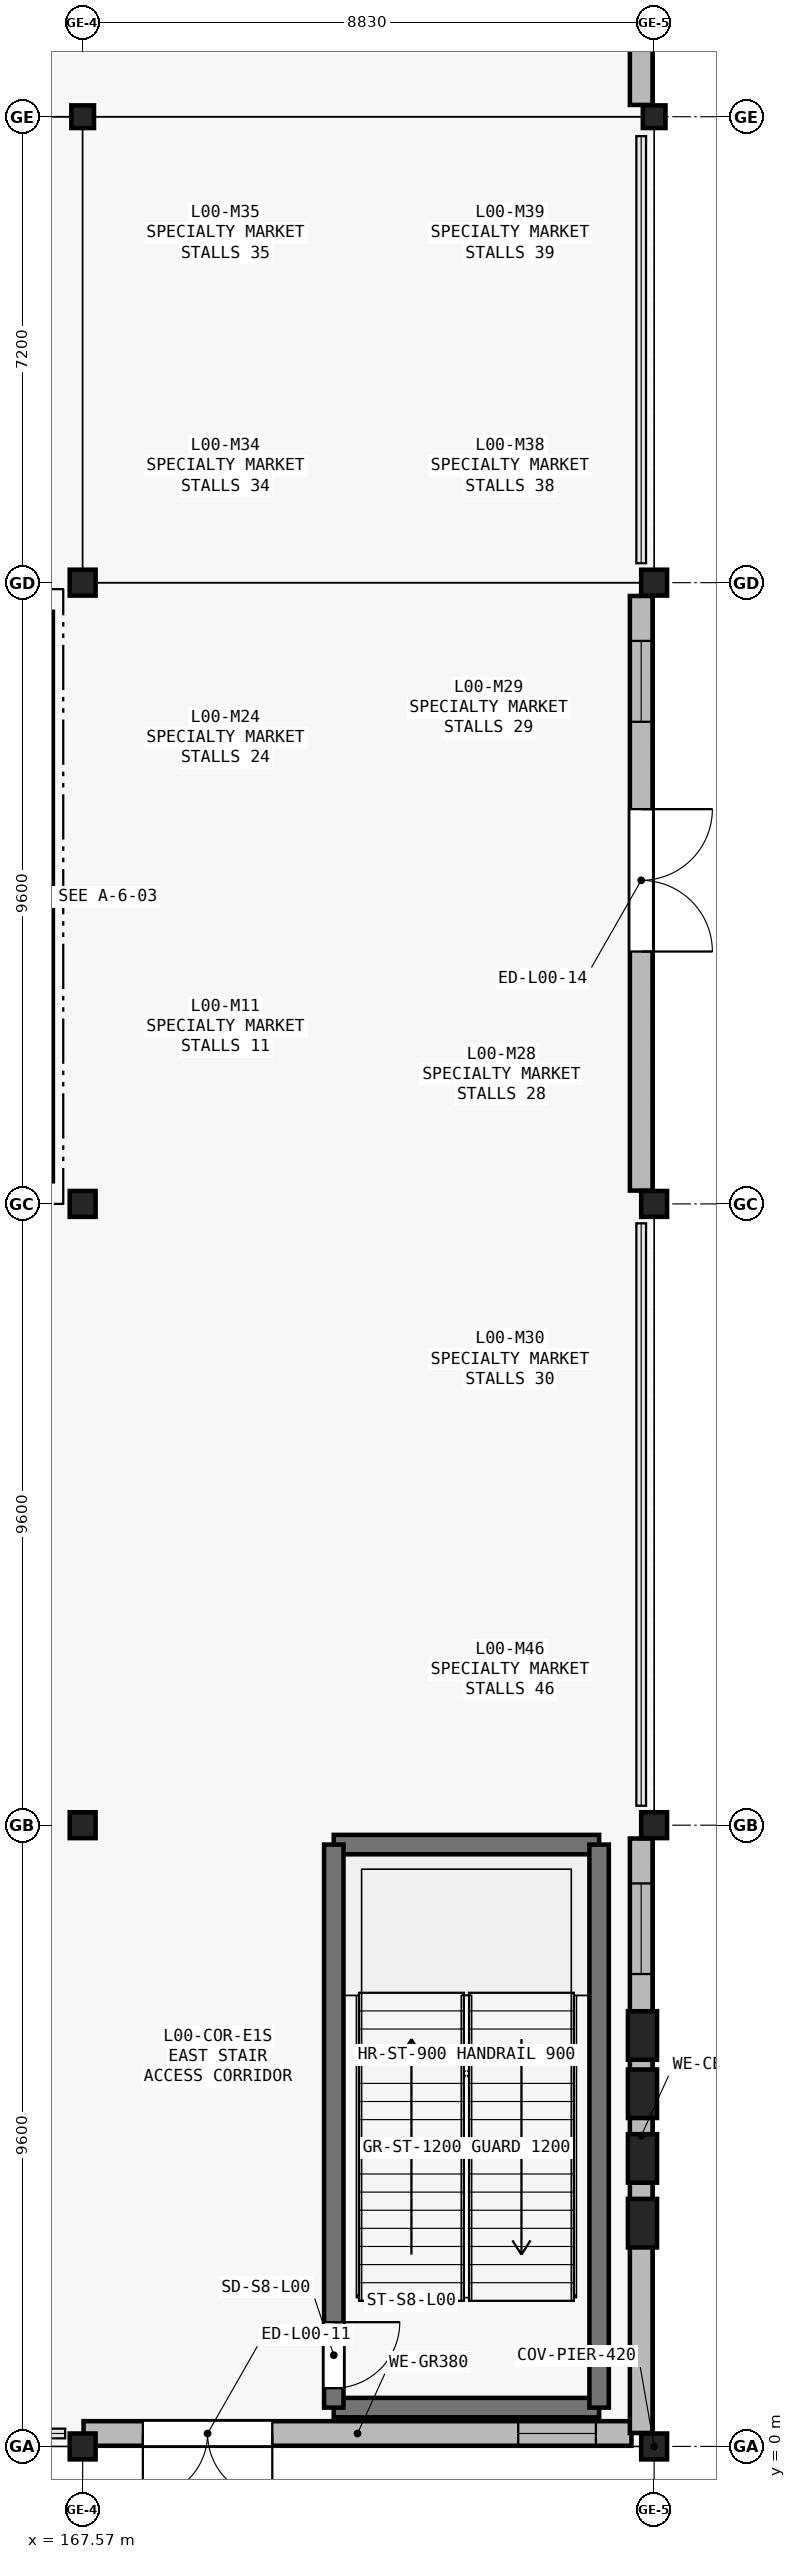
"""IFC4 building model, lengths in metres.
Left out: names, types, materials, properties, quantities, classifications, styles, units other than length and angle.
Written with IfcOpenShell. Run it as: python <this file> out.ifc"""

import sys

from ifc_helpers import new_model, si_unit, direction, frame, frame_2d, origin, origin_2d, place, context, subcontext, project, spatial, rectangle, i_section, extrude, element, fill, save


model = new_model("IFC4")
c1 = context("Model", 3, precision=1e-05, world=origin(), true_north=direction((0.0, 1.0)))
c2 = subcontext(c1, "Body", "Model", "MODEL_VIEW")
j1 = project(units=[si_unit("LENGTHUNIT", "METRE"), si_unit("PLANEANGLEUNIT", "RADIAN")], contexts=[c1])
p1 = place(None, origin())
s1 = spatial("IfcSite", under=j1, at=p1, CompositionType="ELEMENT")
p2 = place(p1, origin())
s2 = spatial("IfcBuilding", under=s1, at=p2, CompositionType="ELEMENT")
p3 = place(p2, origin())
s3 = spatial("IfcBuildingStorey", under=s2, at=p3, CompositionType="ELEMENT", Elevation=0.0)
for number, where, z_axis, x_axis in (
    (1, (167.57, 0.0, 0.0), (0.0, 0.0, 1.0), (1.0, 0.0, 0.0)),
    (2, (167.57, 9.6, 0.0), (0.0, 0.0, 1.0), (1.0, 0.0, 0.0)),
    (3, (167.57, 19.2, 0.0), (0.0, 0.0, 1.0), (1.0, 0.0, 0.0)),
    (4, (167.57, 28.8, 0.0), (0.0, 0.0, 1.0), (1.0, 0.0, 0.0)),
):
    element("IfcColumn", number, at=place(p3, frame(where, z_axis=z_axis, x_axis=x_axis)), inside=s3, PredefinedType="COLUMN", context=c2, shape_type="SweptSolid", body=[
        extrude(i_section(OverallWidth=0.4, OverallDepth=0.4, WebThickness=0.013, FlangeThickness=0.021, FilletRadius=0.022, at=origin_2d()), origin(), (0.0, 0.0, 1.0), 6.0),
    ])
p4 = place(p3, frame((167.57, 36.0, 0.0), z_axis=(0.0, 0.0, 1.0), x_axis=(1.0, 0.0, 0.0)))
e5 = element("IfcColumn", 5, at=p4, inside=s3, PredefinedType="COLUMN", context=c2, shape_type="SweptSolid", body=[
    extrude(i_section(OverallWidth=0.35, OverallDepth=0.35, WebThickness=0.012, FlangeThickness=0.019, FilletRadius=0.02, at=origin_2d()), origin(), (0.0, 0.0, 1.0), 6.0),
])
for number, where, z_axis, x_axis in (
    (6, (176.4, 0.0, 0.0), (0.0, 0.0, 1.0), (1.0, 0.0, 0.0)),
    (7, (176.4, 9.6, 0.0), (0.0, 0.0, 1.0), (1.0, 0.0, 0.0)),
    (8, (176.4, 19.2, 0.0), (0.0, 0.0, 1.0), (1.0, 0.0, 0.0)),
    (9, (176.4, 28.8, 0.0), (0.0, 0.0, 1.0), (1.0, 0.0, 0.0)),
):
    element("IfcColumn", number, at=place(p3, frame(where, z_axis=z_axis, x_axis=x_axis)), inside=s3, PredefinedType="COLUMN", context=c2, shape_type="SweptSolid", body=[
        extrude(i_section(OverallWidth=0.4, OverallDepth=0.4, WebThickness=0.013, FlangeThickness=0.021, FilletRadius=0.022, at=origin_2d()), origin(), (0.0, 0.0, 1.0), 6.0),
    ])
p5 = place(p3, frame((176.4, 36.0, 0.0), z_axis=(0.0, 0.0, 1.0), x_axis=(1.0, 0.0, 0.0)))
e10 = element("IfcColumn", 10, at=p5, inside=s3, PredefinedType="COLUMN", context=c2, shape_type="SweptSolid", body=[
    extrude(i_section(OverallWidth=0.35, OverallDepth=0.35, WebThickness=0.012, FlangeThickness=0.019, FilletRadius=0.02, at=origin_2d()), origin(), (0.0, 0.0, 1.0), 6.0),
])
for number, where, z_axis, x_axis in (
    (11, (176.22, 3.45, 0.0), (0.0, 0.0, 1.0), (1.0, 0.0, 0.0)),
    (12, (176.22, 4.45, 0.0), (0.0, 0.0, 1.0), (1.0, 0.0, 0.0)),
    (13, (176.22, 5.45, 0.0), (0.0, 0.0, 1.0), (1.0, 0.0, 0.0)),
    (14, (176.22, 6.35, 0.0), (0.0, 0.0, 1.0), (1.0, 0.0, 0.0)),
):
    element("IfcColumn", number, at=place(p3, frame(where, z_axis=z_axis, x_axis=x_axis)), inside=s3, PredefinedType="PILASTER", context=c2, shape_type="SweptSolid", body=[
        extrude(rectangle(XDim=0.45, YDim=0.75, at=origin_2d()), origin(), (0.0, 0.0, 1.0), 5.75),
    ])
p6 = place(p3, frame((176.05, 0.2, 0.0), z_axis=(0.0, 0.0, 1.0), x_axis=(-1.0, 0.0, 0.0)))
e15 = element("IfcWall", 15, at=p6, inside=s3, PredefinedType="SOLIDWALL", context=c2, shape_type="SweptSolid", body=[
    extrude(rectangle(XDim=8.466, YDim=0.38, at=frame_2d((4.233, 0.0))), origin(), (0.0, 0.0, 1.0), 5.12),
])
p7 = place(p6, frame((5.55, 0.0, 0.0)))
e16 = element("IfcOpeningElement", 16, at=p7, cuts=e15, PredefinedType="OPENING", context=c2, shape_type="SweptSolid", body=[
    extrude(rectangle(XDim=2.0, YDim=2.2, at=frame_2d((1.0, 1.1))), frame((0.0, 0.2, 0.0), z_axis=(0.0, -1.0, 0.0), x_axis=(1.0, 0.0, 0.0)), (0.0, 0.0, 1.0), 0.4),
])
p8 = place(p6, frame((0.55, 0.0, 1.0)))
e17 = element("IfcOpeningElement", 17, at=p8, cuts=e15, PredefinedType="OPENING", context=c2, shape_type="SweptSolid", body=[
    extrude(rectangle(XDim=1.2, YDim=1.2, at=frame_2d((0.6, 0.6))), frame((0.0, 0.2, 0.0), z_axis=(0.0, -1.0, 0.0), x_axis=(1.0, 0.0, 0.0)), (0.0, 0.0, 1.0), 0.4),
])
p9 = place(p3, frame((176.2, 45.818, 0.0), z_axis=(0.0, 0.0, 1.0), x_axis=(0.0, -1.0, 0.0)))
e18 = element("IfcWall", 18, at=p9, inside=s3, PredefinedType="SOLIDWALL", context=c2, shape_type="SweptSolid", body=[
    extrude(rectangle(XDim=9.636, YDim=0.35, at=frame_2d((4.818, 0.0))), origin(), (0.0, 0.0, 1.0), 5.12),
])
p10 = place(p9, frame((0.718, 0.0, 1.0)))
e19 = element("IfcOpeningElement", 19, at=p10, cuts=e18, PredefinedType="OPENING", context=c2, shape_type="SweptSolid", body=[
    extrude(rectangle(XDim=1.1, YDim=2.1, at=frame_2d((0.55, 1.05))), frame((0.0, 0.185, 0.0), z_axis=(0.0, -1.0, 0.0), x_axis=(1.0, 0.0, 0.0)), (0.0, 0.0, 1.0), 0.37),
])
p11 = place(p3, frame((176.2, 28.594, 0.0), z_axis=(0.0, 0.0, 1.0), x_axis=(0.0, -1.0, 0.0)))
e20 = element("IfcWall", 20, at=p11, inside=s3, PredefinedType="SOLIDWALL", context=c2, shape_type="SweptSolid", body=[
    extrude(rectangle(XDim=9.188, YDim=0.35, at=frame_2d((4.594, 0.0))), origin(), (0.0, 0.0, 1.0), 5.12),
])
p12 = place(p11, frame((3.294, 0.0, 0.0)))
e21 = element("IfcOpeningElement", 21, at=p12, cuts=e20, PredefinedType="OPENING", context=c2, shape_type="SweptSolid", body=[
    extrude(rectangle(XDim=2.2, YDim=2.3, at=frame_2d((1.1, 1.15))), frame((0.0, 0.185, 0.0), z_axis=(0.0, -1.0, 0.0), x_axis=(1.0, 0.0, 0.0)), (0.0, 0.0, 1.0), 0.37),
])
p13 = place(p11, frame((0.694, 0.0, 1.0)))
e22 = element("IfcOpeningElement", 22, at=p13, cuts=e20, PredefinedType="OPENING", context=c2, shape_type="SweptSolid", body=[
    extrude(rectangle(XDim=1.25, YDim=2.1, at=frame_2d((0.625, 1.05))), frame((0.0, 0.185, 0.0), z_axis=(0.0, -1.0, 0.0), x_axis=(1.0, 0.0, 0.0)), (0.0, 0.0, 1.0), 0.37),
])
p14 = place(p3, frame((176.2, 9.394, 0.0), z_axis=(0.0, 0.0, 1.0), x_axis=(0.0, -1.0, 0.0)))
e23 = element("IfcWall", 23, at=p14, inside=s3, PredefinedType="SOLIDWALL", context=c2, shape_type="SweptSolid", body=[
    extrude(rectangle(XDim=9.186, YDim=0.35, at=frame_2d((4.593, 0.0))), origin(), (0.0, 0.0, 1.0), 5.12),
])
p15 = place(p14, frame((0.694, 0.0, 1.0)))
e24 = element("IfcOpeningElement", 24, at=p15, cuts=e23, PredefinedType="OPENING", context=c2, shape_type="SweptSolid", body=[
    extrude(rectangle(XDim=1.4, YDim=2.1, at=frame_2d((0.7, 1.05))), frame((0.0, 0.185, 0.0), z_axis=(0.0, -1.0, 0.0), x_axis=(1.0, 0.0, 0.0)), (0.0, 0.0, 1.0), 0.37),
])
p16 = place(p3, frame((166.92, 19.55, 0.0), z_axis=(0.0, 0.0, 1.0), x_axis=(0.0, 1.0, 0.0)))
e25 = element("IfcWall", 25, at=p16, inside=s3, PredefinedType="SHEAR", context=c2, shape_type="SweptSolid", body=[
    extrude(rectangle(XDim=8.8, YDim=0.38, at=frame_2d((4.4, 0.0))), origin(), (0.0, 0.0, 1.0), 6.0),
])
for number, where, z_axis, x_axis in (
    (26, (171.45, 0.6, 0.0), (0.0, 0.0, 1.0), (1.0, 0.0, 0.0)),
    (27, (175.55, 9.3, 0.0), (0.0, 0.0, 1.0), (-1.0, 0.0, 0.0)),
):
    element("IfcWall", number, at=place(p3, frame(where, z_axis=z_axis, x_axis=x_axis)), inside=s3, PredefinedType="SHEAR", context=c2, shape_type="SweptSolid", body=[
        extrude(rectangle(XDim=4.1, YDim=0.3, at=frame_2d((2.05, 0.0))), origin(), (0.0, 0.0, 1.0), 6.0),
    ])
p17 = place(p3, frame((171.45, 9.3, 0.0), z_axis=(0.0, 0.0, 1.0), x_axis=(0.0, -1.0, 0.0)))
e28 = element("IfcWall", 28, at=p17, inside=s3, PredefinedType="SHEAR", context=c2, shape_type="SweptSolid", body=[
    extrude(rectangle(XDim=8.7, YDim=0.3, at=frame_2d((4.35, 0.0))), origin(), (0.0, 0.0, 1.0), 6.0),
])
p18 = place(p17, frame((7.38, 0.0, 0.0)))
e29 = element("IfcOpeningElement", 29, at=p18, cuts=e28, PredefinedType="OPENING", context=c2, shape_type="SweptSolid", body=[
    extrude(rectangle(XDim=1.02, YDim=2.1, at=frame_2d((0.51, 1.05))), frame((0.0, 0.16, 0.0), z_axis=(0.0, -1.0, 0.0), x_axis=(1.0, 0.0, 0.0)), (0.0, 0.0, 1.0), 0.32),
])
p19 = place(p3, frame((175.55, 0.6, 0.0), z_axis=(0.0, 0.0, 1.0), x_axis=(0.0, 1.0, 0.0)))
e30 = element("IfcWall", 30, at=p19, inside=s3, PredefinedType="SHEAR", context=c2, shape_type="SweptSolid", body=[
    extrude(rectangle(XDim=8.7, YDim=0.3, at=frame_2d((4.35, 0.0))), origin(), (0.0, 0.0, 1.0), 6.0),
])
p20 = place(p7, origin())
e31 = element("IfcDoor", 31, at=p20, inside=s3, OperationType="DOUBLE_DOOR_SINGLE_SWING", PredefinedType="DOOR", context=c2, shape_type="SweptSolid", body=[
    extrude(rectangle(XDim=2.0, YDim=2.2, at=frame_2d((1.0, 1.1))), frame((0.0, 0.025, 0.0), z_axis=(0.0, -1.0, 0.0), x_axis=(1.0, 0.0, 0.0)), (0.0, 0.0, 1.0), 0.05),
])
fill(e16, e31)
p21 = place(p8, origin())
e32 = element("IfcWindow", 32, at=p21, inside=s3, PartitioningType="SINGLE_PANEL", PredefinedType="WINDOW", context=c2, shape_type="SweptSolid", body=[
    extrude(rectangle(XDim=1.2, YDim=1.2, at=frame_2d((0.6, 0.6))), frame((0.0, 0.03, 0.0), z_axis=(0.0, -1.0, 0.0), x_axis=(1.0, 0.0, 0.0)), (0.0, 0.0, 1.0), 0.06),
])
fill(e17, e32)
p22 = place(p12, origin())
e33 = element("IfcDoor", 33, at=p22, inside=s3, OperationType="DOUBLE_DOOR_SINGLE_SWING", PredefinedType="DOOR", context=c2, shape_type="SweptSolid", body=[
    extrude(rectangle(XDim=2.2, YDim=2.3, at=frame_2d((1.1, 1.15))), frame((0.0, 0.025, 0.0), z_axis=(0.0, -1.0, 0.0), x_axis=(1.0, 0.0, 0.0)), (0.0, 0.0, 1.0), 0.05),
])
fill(e21, e33)
p23 = place(p13, origin())
e34 = element("IfcWindow", 34, at=p23, inside=s3, PartitioningType="SINGLE_PANEL", PredefinedType="WINDOW", context=c2, shape_type="SweptSolid", body=[
    extrude(rectangle(XDim=1.25, YDim=2.1, at=frame_2d((0.625, 1.05))), frame((0.0, 0.03, 0.0), z_axis=(0.0, -1.0, 0.0), x_axis=(1.0, 0.0, 0.0)), (0.0, 0.0, 1.0), 0.06),
])
fill(e22, e34)
p24 = place(p15, origin())
e35 = element("IfcWindow", 35, at=p24, inside=s3, PartitioningType="SINGLE_PANEL", PredefinedType="WINDOW", context=c2, shape_type="SweptSolid", body=[
    extrude(rectangle(XDim=1.4, YDim=2.1, at=frame_2d((0.7, 1.05))), frame((0.0, 0.03, 0.0), z_axis=(0.0, -1.0, 0.0), x_axis=(1.0, 0.0, 0.0)), (0.0, 0.0, 1.0), 0.06),
])
fill(e24, e35)
p25 = place(p18, origin())
e36 = element("IfcDoor", 36, at=p25, inside=s3, OperationType="SINGLE_SWING_LEFT", PredefinedType="DOOR", context=c2, shape_type="SweptSolid", body=[
    extrude(rectangle(XDim=1.02, YDim=2.1, at=frame_2d((0.51, 1.05))), frame((0.0, 0.025, 0.0), z_axis=(0.0, -1.0, 0.0), x_axis=(1.0, 0.0, 0.0)), (0.0, 0.0, 1.0), 0.05),
])
fill(e29, e36)
save(model, sys.argv[1])
